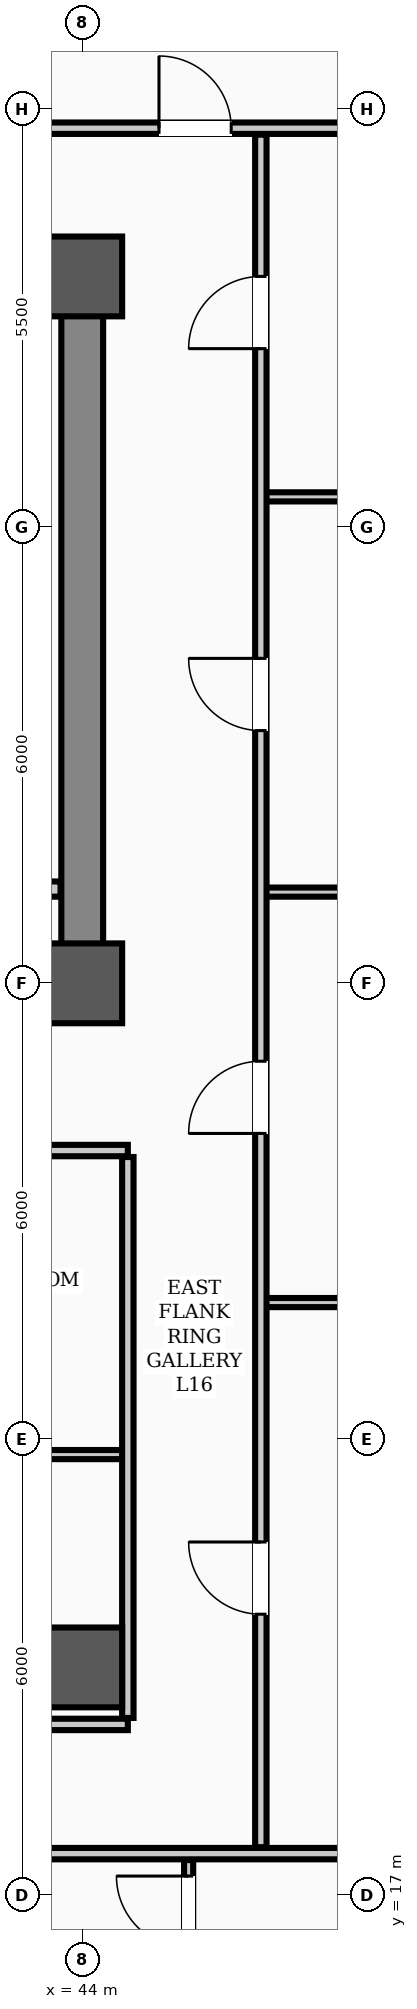
"""IFC4 building model, lengths in metres.
Left out: names, types, materials, properties, quantities, classifications, styles, units other than length and angle.
Written with IfcOpenShell. Run it as: python <this file> out.ifc"""

import sys

from ifc_helpers import new_model, si_unit, direction, frame, frame_2d, origin, origin_2d, place, context, subcontext, project, spatial, rectangle, hollow_rectangle, extrude, element, fill, save


model = new_model("IFC4")
c1 = context("Model", 3, precision=1e-05, world=origin(), true_north=direction((0.0, 1.0)))
c2 = subcontext(c1, "Body", "Model", "MODEL_VIEW")
j1 = project(units=[si_unit("LENGTHUNIT", "METRE"), si_unit("PLANEANGLEUNIT", "RADIAN")], contexts=[c1])
p1 = place(None, origin())
s1 = spatial("IfcSite", under=j1, at=p1, CompositionType="ELEMENT")
p2 = place(p1, origin())
s2 = spatial("IfcBuilding", under=s1, at=p2, CompositionType="ELEMENT")
p3 = place(p2, frame((0.0, 0.0, 65.5)))
s3 = spatial("IfcBuildingStorey", under=s2, at=p3, CompositionType="ELEMENT", Elevation=65.5)
for number, where, z_axis, x_axis in (
    (1, (44.0, 29.0, 0.0), (0.0, 0.0, 1.0), (1.0, 0.0, 0.0)),
    (2, (44.0, 38.3, 0.0), (0.0, 0.0, 1.0), (1.0, 0.0, 0.0)),
    (3, (44.0, 20.0, 0.0), (0.0, 0.0, 1.0), (1.0, 0.0, 0.0)),
):
    element("IfcColumn", number, at=place(p3, frame(where, z_axis=z_axis, x_axis=x_axis)), inside=s3, PredefinedType="COLUMN", context=c2, shape_type="SweptSolid", body=[
        extrude(hollow_rectangle(XDim=1.05, YDim=1.05, WallThickness=0.038, InnerFilletRadius=0.019, OuterFilletRadius=0.057, at=origin_2d()), origin(), (0.0, 0.0, 1.0), 3.9),
    ])
p4 = place(p3, frame((13.5, 29.0, 0.0), z_axis=(0.0, 0.0, 1.0), x_axis=(1.0, 0.0, 0.0)))
e4 = element("IfcWall", 4, at=p4, inside=s3, PredefinedType="SHEAR", context=c2, shape_type="SweptSolid", body=[
    extrude(rectangle(XDim=30.5, YDim=0.55, at=frame_2d((15.25, 0.0))), origin(), (0.0, 0.0, 1.0), 3.72),
])
p5 = place(p4, frame((1.75, 0.0, 0.0)))
e5 = element("IfcOpeningElement", 5, at=p5, cuts=e4, PredefinedType="OPENING", context=c2, shape_type="SweptSolid", body=[
    extrude(rectangle(XDim=1.1, YDim=2.08, at=frame_2d((0.55, 1.04))), frame((0.0, 0.285, 0.0), z_axis=(0.0, -1.0, 0.0), x_axis=(1.0, 0.0, 0.0)), (0.0, 0.0, 1.0), 0.57),
])
p6 = place(p4, frame((26.7, 0.0, 0.0)))
e6 = element("IfcOpeningElement", 6, at=p6, cuts=e4, PredefinedType="OPENING", context=c2, shape_type="SweptSolid", body=[
    extrude(rectangle(XDim=1.1, YDim=2.08, at=frame_2d((0.55, 1.04))), frame((0.0, 0.285, 0.0), z_axis=(0.0, -1.0, 0.0), x_axis=(1.0, 0.0, 0.0)), (0.0, 0.0, 1.0), 0.57),
])
p7 = place(p4, frame((6.8, 0.0, 0.0)))
e7 = element("IfcOpeningElement", 7, at=p7, cuts=e4, PredefinedType="OPENING", context=c2, shape_type="SweptSolid", body=[
    extrude(rectangle(XDim=1.1, YDim=2.08, at=frame_2d((0.55, 1.04))), frame((0.0, 0.285, 0.0), z_axis=(0.0, -1.0, 0.0), x_axis=(1.0, 0.0, 0.0)), (0.0, 0.0, 1.0), 0.57),
])
p8 = place(p4, frame((13.2, 0.0, 0.0)))
e8 = element("IfcOpeningElement", 8, at=p8, cuts=e4, PredefinedType="OPENING", context=c2, shape_type="SweptSolid", body=[
    extrude(rectangle(XDim=1.6, YDim=2.08, at=frame_2d((0.8, 1.04))), frame((0.0, 0.285, 0.0), z_axis=(0.0, -1.0, 0.0), x_axis=(1.0, 0.0, 0.0)), (0.0, 0.0, 1.0), 0.57),
])
p9 = place(p4, frame((19.53, 0.0, 0.0)))
e9 = element("IfcOpeningElement", 9, at=p9, cuts=e4, PredefinedType="OPENING", context=c2, shape_type="SweptSolid", body=[
    extrude(rectangle(XDim=0.9, YDim=2.08, at=frame_2d((0.45, 1.04))), frame((0.0, 0.285, 0.0), z_axis=(0.0, -1.0, 0.0), x_axis=(1.0, 0.0, 0.0)), (0.0, 0.0, 1.0), 0.57),
])
p10 = place(p4, frame((21.57, 0.0, 0.0)))
e10 = element("IfcOpeningElement", 10, at=p10, cuts=e4, PredefinedType="OPENING", context=c2, shape_type="SweptSolid", body=[
    extrude(rectangle(XDim=0.9, YDim=2.08, at=frame_2d((0.45, 1.04))), frame((0.0, 0.285, 0.0), z_axis=(0.0, -1.0, 0.0), x_axis=(1.0, 0.0, 0.0)), (0.0, 0.0, 1.0), 0.57),
])
p11 = place(p3, frame((13.5, 38.3, 0.0), z_axis=(0.0, 0.0, 1.0), x_axis=(1.0, 0.0, 0.0)))
e11 = element("IfcWall", 11, at=p11, inside=s3, PredefinedType="SHEAR", context=c2, shape_type="SweptSolid", body=[
    extrude(rectangle(XDim=30.5, YDim=0.55, at=frame_2d((15.25, 0.0))), origin(), (0.0, 0.0, 1.0), 3.72),
])
p12 = place(p3, frame((44.0, 29.35, 0.0), z_axis=(0.0, 0.0, 1.0), x_axis=(0.0, 1.0, 0.0)))
e12 = element("IfcWall", 12, at=p12, inside=s3, PredefinedType="SHEAR", context=c2, shape_type="SweptSolid", body=[
    extrude(rectangle(XDim=8.6, YDim=0.55, at=frame_2d((4.3, 0.0))), origin(), (0.0, 0.0, 1.0), 3.72),
])
p13 = place(p3, frame((42.4, 30.24, 0.0), z_axis=(0.0, 0.0, 1.0), x_axis=(1.0, 0.0, 0.0)))
e13 = element("IfcWall", 13, at=p13, inside=s3, PredefinedType="STANDARD", context=c2, shape_type="SweptSolid", body=[
    extrude(rectangle(XDim=1.315, YDim=0.2, at=frame_2d((0.658, 0.0))), origin(), (0.0, 0.0, 1.0), 3.1),
])
p14 = place(p3, frame((12.9, 26.8, 0.0), z_axis=(0.0, 0.0, 1.0), x_axis=(1.0, 0.0, 0.0)))
e14 = element("IfcWall", 14, at=p14, inside=s3, PredefinedType="PARTITIONING", context=c2, shape_type="SweptSolid", body=[
    extrude(rectangle(XDim=31.7, YDim=0.15, at=frame_2d((15.85, 0.0))), origin(), (0.0, 0.0, 1.0), 3.1),
])
p15 = place(p14, frame((13.6, 0.0, 0.0)))
e15 = element("IfcOpeningElement", 15, at=p15, cuts=e14, PredefinedType="OPENING", context=c2, shape_type="SweptSolid", body=[
    extrude(rectangle(XDim=1.6, YDim=2.08, at=frame_2d((0.8, 1.04))), frame((0.0, 0.085, 0.0), z_axis=(0.0, -1.0, 0.0), x_axis=(1.0, 0.0, 0.0)), (0.0, 0.0, 1.0), 0.17),
])
p16 = place(p14, frame((2.475, 0.0, 0.0)))
e16 = element("IfcOpeningElement", 16, at=p16, cuts=e14, PredefinedType="OPENING", context=c2, shape_type="SweptSolid", body=[
    extrude(rectangle(XDim=0.95, YDim=2.08, at=frame_2d((0.475, 1.04))), frame((0.0, 0.085, 0.0), z_axis=(0.0, -1.0, 0.0), x_axis=(1.0, 0.0, 0.0)), (0.0, 0.0, 1.0), 0.17),
])
p17 = place(p14, frame((9.125, 0.0, 0.0)))
e17 = element("IfcOpeningElement", 17, at=p17, cuts=e14, PredefinedType="OPENING", context=c2, shape_type="SweptSolid", body=[
    extrude(rectangle(XDim=0.95, YDim=2.08, at=frame_2d((0.475, 1.04))), frame((0.0, 0.085, 0.0), z_axis=(0.0, -1.0, 0.0), x_axis=(1.0, 0.0, 0.0)), (0.0, 0.0, 1.0), 0.17),
])
p18 = place(p14, frame((19.125, 0.0, 0.0)))
e18 = element("IfcOpeningElement", 18, at=p18, cuts=e14, PredefinedType="OPENING", context=c2, shape_type="SweptSolid", body=[
    extrude(rectangle(XDim=0.95, YDim=2.08, at=frame_2d((0.475, 1.04))), frame((0.0, 0.085, 0.0), z_axis=(0.0, -1.0, 0.0), x_axis=(1.0, 0.0, 0.0)), (0.0, 0.0, 1.0), 0.17),
])
p19 = place(p14, frame((26.325, 0.0, 0.0)))
e19 = element("IfcOpeningElement", 19, at=p19, cuts=e14, PredefinedType="OPENING", context=c2, shape_type="SweptSolid", body=[
    extrude(rectangle(XDim=0.95, YDim=2.08, at=frame_2d((0.475, 1.04))), frame((0.0, 0.085, 0.0), z_axis=(0.0, -1.0, 0.0), x_axis=(1.0, 0.0, 0.0)), (0.0, 0.0, 1.0), 0.17),
])
p20 = place(p3, frame((10.16, 17.55, 0.0), z_axis=(0.0, 0.0, 1.0), x_axis=(1.0, 0.0, 0.0)))
e20 = element("IfcWall", 20, at=p20, inside=s3, PredefinedType="PARTITIONING", context=c2, shape_type="SweptSolid", body=[
    extrude(rectangle(XDim=44.68, YDim=0.15, at=frame_2d((22.34, 0.0))), origin(), (0.0, 0.0, 1.0), 3.1),
])
p21 = place(p20, frame((2.04, 0.0, 0.0)))
e21 = element("IfcOpeningElement", 21, at=p21, cuts=e20, PredefinedType="OPENING", context=c2, shape_type="SweptSolid", body=[
    extrude(rectangle(XDim=0.95, YDim=2.08, at=frame_2d((0.475, 1.04))), frame((0.0, 0.085, 0.0), z_axis=(0.0, -1.0, 0.0), x_axis=(1.0, 0.0, 0.0)), (0.0, 0.0, 1.0), 0.17),
])
p22 = place(p20, frame((6.565, 0.0, 0.0)))
e22 = element("IfcOpeningElement", 22, at=p22, cuts=e20, PredefinedType="OPENING", context=c2, shape_type="SweptSolid", body=[
    extrude(rectangle(XDim=0.95, YDim=2.08, at=frame_2d((0.475, 1.04))), frame((0.0, 0.085, 0.0), z_axis=(0.0, -1.0, 0.0), x_axis=(1.0, 0.0, 0.0)), (0.0, 0.0, 1.0), 0.17),
])
p23 = place(p20, frame((11.865, 0.0, 0.0)))
e23 = element("IfcOpeningElement", 23, at=p23, cuts=e20, PredefinedType="OPENING", context=c2, shape_type="SweptSolid", body=[
    extrude(rectangle(XDim=0.95, YDim=2.08, at=frame_2d((0.475, 1.04))), frame((0.0, 0.085, 0.0), z_axis=(0.0, -1.0, 0.0), x_axis=(1.0, 0.0, 0.0)), (0.0, 0.0, 1.0), 0.17),
])
p24 = place(p20, frame((24.665, 0.0, 0.0)))
e24 = element("IfcOpeningElement", 24, at=p24, cuts=e20, PredefinedType="OPENING", context=c2, shape_type="SweptSolid", body=[
    extrude(rectangle(XDim=0.95, YDim=2.08, at=frame_2d((0.475, 1.04))), frame((0.0, 0.085, 0.0), z_axis=(0.0, -1.0, 0.0), x_axis=(1.0, 0.0, 0.0)), (0.0, 0.0, 1.0), 0.17),
])
p25 = place(p20, frame((31.765, 0.0, 0.0)))
e25 = element("IfcOpeningElement", 25, at=p25, cuts=e20, PredefinedType="OPENING", context=c2, shape_type="SweptSolid", body=[
    extrude(rectangle(XDim=0.95, YDim=2.08, at=frame_2d((0.475, 1.04))), frame((0.0, 0.085, 0.0), z_axis=(0.0, -1.0, 0.0), x_axis=(1.0, 0.0, 0.0)), (0.0, 0.0, 1.0), 0.17),
])
p26 = place(p3, frame((28.4, 19.25, 0.0), z_axis=(0.0, 0.0, 1.0), x_axis=(1.0, 0.0, 0.0)))
e26 = element("IfcWall", 26, at=p26, inside=s3, PredefinedType="PARTITIONING", context=c2, shape_type="SweptSolid", body=[
    extrude(rectangle(XDim=16.2, YDim=0.15, at=frame_2d((8.1, 0.0))), origin(), (0.0, 0.0, 1.0), 3.1),
])
p27 = place(p26, frame((3.625, 0.0, 0.0)))
e27 = element("IfcOpeningElement", 27, at=p27, cuts=e26, PredefinedType="OPENING", context=c2, shape_type="SweptSolid", body=[
    extrude(rectangle(XDim=0.95, YDim=2.08, at=frame_2d((0.475, 1.04))), frame((0.0, 0.085, 0.0), z_axis=(0.0, -1.0, 0.0), x_axis=(1.0, 0.0, 0.0)), (0.0, 0.0, 1.0), 0.17),
])
p28 = place(p26, frame((10.825, 0.0, 0.0)))
e28 = element("IfcOpeningElement", 28, at=p28, cuts=e26, PredefinedType="OPENING", context=c2, shape_type="SweptSolid", body=[
    extrude(rectangle(XDim=0.95, YDim=2.08, at=frame_2d((0.475, 1.04))), frame((0.0, 0.085, 0.0), z_axis=(0.0, -1.0, 0.0), x_axis=(1.0, 0.0, 0.0)), (0.0, 0.0, 1.0), 0.17),
])
p29 = place(p3, frame((34.8, 22.8, 0.0), z_axis=(0.0, 0.0, 1.0), x_axis=(1.0, 0.0, 0.0)))
e29 = element("IfcWall", 29, at=p29, inside=s3, PredefinedType="PARTITIONING", context=c2, shape_type="SweptSolid", body=[
    extrude(rectangle(XDim=9.8, YDim=0.12, at=frame_2d((4.9, 0.0))), origin(), (0.0, 0.0, 1.0), 3.1),
])
for number, where, z_axis, x_axis in (
    (30, (46.35, 24.8, 0.0), (0.0, 0.0, 1.0), (1.0, 0.0, 0.0)),
    (31, (46.35, 30.2, 0.0), (0.0, 0.0, 1.0), (1.0, 0.0, 0.0)),
    (32, (46.35, 35.4, 0.0), (0.0, 0.0, 1.0), (1.0, 0.0, 0.0)),
):
    element("IfcWall", number, at=place(p3, frame(where, z_axis=z_axis, x_axis=x_axis)), inside=s3, PredefinedType="PARTITIONING", context=c2, shape_type="SweptSolid", body=[
        extrude(rectangle(XDim=10.84, YDim=0.12, at=frame_2d((5.42, 0.0))), origin(), (0.0, 0.0, 1.0), 3.212),
    ])
p30 = place(p3, frame((7.81, 40.25, 0.0), z_axis=(0.0, 0.0, 1.0), x_axis=(1.0, 0.0, 0.0)))
e33 = element("IfcWall", 33, at=p30, inside=s3, PredefinedType="PARTITIONING", context=c2, shape_type="SweptSolid", body=[
    extrude(rectangle(XDim=49.38, YDim=0.15, at=frame_2d((24.69, 0.0))), origin(), (0.0, 0.0, 1.0), 3.1),
])
p31 = place(p30, frame((3.73, 0.0, 0.0)))
e34 = element("IfcOpeningElement", 34, at=p31, cuts=e33, PredefinedType="OPENING", context=c2, shape_type="SweptSolid", body=[
    extrude(rectangle(XDim=0.95, YDim=2.08, at=frame_2d((0.475, 1.04))), frame((0.0, 0.085, 0.0), z_axis=(0.0, -1.0, 0.0), x_axis=(1.0, 0.0, 0.0)), (0.0, 0.0, 1.0), 0.17),
])
p32 = place(p30, frame((11.015, 0.0, 0.0)))
e35 = element("IfcOpeningElement", 35, at=p32, cuts=e33, PredefinedType="OPENING", context=c2, shape_type="SweptSolid", body=[
    extrude(rectangle(XDim=0.95, YDim=2.08, at=frame_2d((0.475, 1.04))), frame((0.0, 0.085, 0.0), z_axis=(0.0, -1.0, 0.0), x_axis=(1.0, 0.0, 0.0)), (0.0, 0.0, 1.0), 0.17),
])
p33 = place(p30, frame((18.215, 0.0, 0.0)))
e36 = element("IfcOpeningElement", 36, at=p33, cuts=e33, PredefinedType="OPENING", context=c2, shape_type="SweptSolid", body=[
    extrude(rectangle(XDim=0.95, YDim=2.08, at=frame_2d((0.475, 1.04))), frame((0.0, 0.085, 0.0), z_axis=(0.0, -1.0, 0.0), x_axis=(1.0, 0.0, 0.0)), (0.0, 0.0, 1.0), 0.17),
])
p34 = place(p30, frame((25.515, 0.0, 0.0)))
e37 = element("IfcOpeningElement", 37, at=p34, cuts=e33, PredefinedType="OPENING", context=c2, shape_type="SweptSolid", body=[
    extrude(rectangle(XDim=0.95, YDim=2.08, at=frame_2d((0.475, 1.04))), frame((0.0, 0.085, 0.0), z_axis=(0.0, -1.0, 0.0), x_axis=(1.0, 0.0, 0.0)), (0.0, 0.0, 1.0), 0.17),
])
p35 = place(p30, frame((31.915, 0.0, 0.0)))
e38 = element("IfcOpeningElement", 38, at=p35, cuts=e33, PredefinedType="OPENING", context=c2, shape_type="SweptSolid", body=[
    extrude(rectangle(XDim=0.95, YDim=2.08, at=frame_2d((0.475, 1.04))), frame((0.0, 0.085, 0.0), z_axis=(0.0, -1.0, 0.0), x_axis=(1.0, 0.0, 0.0)), (0.0, 0.0, 1.0), 0.17),
])
p36 = place(p30, frame((37.2, 0.0, 0.0)))
e39 = element("IfcOpeningElement", 39, at=p36, cuts=e33, PredefinedType="OPENING", context=c2, shape_type="SweptSolid", body=[
    extrude(rectangle(XDim=0.95, YDim=2.08, at=frame_2d((0.475, 1.04))), frame((0.0, 0.085, 0.0), z_axis=(0.0, -1.0, 0.0), x_axis=(1.0, 0.0, 0.0)), (0.0, 0.0, 1.0), 0.17),
])
p37 = place(p3, frame((46.35, 17.635, 0.0), z_axis=(0.0, 0.0, 1.0), x_axis=(0.0, 1.0, 0.0)))
e40 = element("IfcWall", 40, at=p37, inside=s3, PredefinedType="PARTITIONING", context=c2, shape_type="SweptSolid", body=[
    extrude(rectangle(XDim=22.53, YDim=0.15, at=frame_2d((11.265, 0.0))), origin(), (0.0, 0.0, 1.0), 3.0),
])
p38 = place(p37, frame((3.065, 0.0, 0.0)))
e41 = element("IfcOpeningElement", 41, at=p38, cuts=e40, PredefinedType="OPENING", context=c2, shape_type="SweptSolid", body=[
    extrude(rectangle(XDim=0.95, YDim=2.08, at=frame_2d((0.475, 1.04))), frame((0.0, 0.085, 0.0), z_axis=(0.0, -1.0, 0.0), x_axis=(1.0, 0.0, 0.0)), (0.0, 0.0, 1.0), 0.17),
])
p39 = place(p37, frame((9.39, 0.0, 0.0)))
e42 = element("IfcOpeningElement", 42, at=p39, cuts=e40, PredefinedType="OPENING", context=c2, shape_type="SweptSolid", body=[
    extrude(rectangle(XDim=0.95, YDim=2.08, at=frame_2d((0.475, 1.04))), frame((0.0, 0.085, 0.0), z_axis=(0.0, -1.0, 0.0), x_axis=(1.0, 0.0, 0.0)), (0.0, 0.0, 1.0), 0.17),
])
p40 = place(p37, frame((14.69, 0.0, 0.0)))
e43 = element("IfcOpeningElement", 43, at=p40, cuts=e40, PredefinedType="OPENING", context=c2, shape_type="SweptSolid", body=[
    extrude(rectangle(XDim=0.95, YDim=2.08, at=frame_2d((0.475, 1.04))), frame((0.0, 0.085, 0.0), z_axis=(0.0, -1.0, 0.0), x_axis=(1.0, 0.0, 0.0)), (0.0, 0.0, 1.0), 0.17),
])
p41 = place(p37, frame((19.715, 0.0, 0.0)))
e44 = element("IfcOpeningElement", 44, at=p41, cuts=e40, PredefinedType="OPENING", context=c2, shape_type="SweptSolid", body=[
    extrude(rectangle(XDim=0.95, YDim=2.08, at=frame_2d((0.475, 1.04))), frame((0.0, 0.085, 0.0), z_axis=(0.0, -1.0, 0.0), x_axis=(1.0, 0.0, 0.0)), (0.0, 0.0, 1.0), 0.17),
])
p42 = place(p3, frame((44.6, 19.335, 0.0), z_axis=(0.0, 0.0, 1.0), x_axis=(0.0, 1.0, 0.0)))
e45 = element("IfcWall", 45, at=p42, inside=s3, PredefinedType="PARTITIONING", context=c2, shape_type="SweptSolid", body=[
    extrude(rectangle(XDim=7.38, YDim=0.15, at=frame_2d((3.69, 0.0))), origin(), (0.0, 0.0, 1.0), 3.0),
])
p43 = place(p3, frame((45.4, 15.31, 0.0), z_axis=(0.0, 0.0, 1.0), x_axis=(0.0, 1.0, 0.0)))
e46 = element("IfcWall", 46, at=p43, inside=s3, PredefinedType="PARTITIONING", context=c2, shape_type="SweptSolid", body=[
    extrude(rectangle(XDim=2.155, YDim=0.12, at=frame_2d((1.078, 0.0))), origin(), (0.0, 0.0, 1.0), 3.72),
])
p44 = place(p43, frame((0.995, 0.0, 0.0)))
e47 = element("IfcOpeningElement", 47, at=p44, cuts=e46, PredefinedType="OPENING", context=c2, shape_type="SweptSolid", body=[
    extrude(rectangle(XDim=0.95, YDim=2.08, at=frame_2d((0.475, 1.04))), frame((0.0, 0.07, 0.0), z_axis=(0.0, -1.0, 0.0), x_axis=(1.0, 0.0, 0.0)), (0.0, 0.0, 1.0), 0.14),
])
p45 = place(p44, origin())
e48 = element("IfcDoor", 48, at=p45, inside=s3, OperationType="SINGLE_SWING_RIGHT", PredefinedType="DOOR", context=c2, shape_type="SweptSolid", body=[
    extrude(rectangle(XDim=0.95, YDim=2.08, at=frame_2d((0.475, 1.04))), frame((0.0, 0.025, 0.0), z_axis=(0.0, -1.0, 0.0), x_axis=(1.0, 0.0, 0.0)), (0.0, 0.0, 1.0), 0.05),
])
fill(e47, e48)
p46 = place(p38, origin())
e49 = element("IfcDoor", 49, at=p46, inside=s3, OperationType="SINGLE_SWING_RIGHT", PredefinedType="DOOR", context=c2, shape_type="SweptSolid", body=[
    extrude(rectangle(XDim=0.95, YDim=2.08, at=frame_2d((0.475, 1.04))), frame((0.0, 0.025, 0.0), z_axis=(0.0, -1.0, 0.0), x_axis=(1.0, 0.0, 0.0)), (0.0, 0.0, 1.0), 0.05),
])
fill(e41, e49)
p47 = place(p39, origin())
e50 = element("IfcDoor", 50, at=p47, inside=s3, OperationType="SINGLE_SWING_LEFT", PredefinedType="DOOR", context=c2, shape_type="SweptSolid", body=[
    extrude(rectangle(XDim=0.95, YDim=2.08, at=frame_2d((0.475, 1.04))), frame((0.0, 0.025, 0.0), z_axis=(0.0, -1.0, 0.0), x_axis=(1.0, 0.0, 0.0)), (0.0, 0.0, 1.0), 0.05),
])
fill(e42, e50)
p48 = place(p40, origin())
e51 = element("IfcDoor", 51, at=p48, inside=s3, OperationType="SINGLE_SWING_RIGHT", PredefinedType="DOOR", context=c2, shape_type="SweptSolid", body=[
    extrude(rectangle(XDim=0.95, YDim=2.08, at=frame_2d((0.475, 1.04))), frame((0.0, 0.025, 0.0), z_axis=(0.0, -1.0, 0.0), x_axis=(1.0, 0.0, 0.0)), (0.0, 0.0, 1.0), 0.05),
])
fill(e43, e51)
p49 = place(p41, origin())
e52 = element("IfcDoor", 52, at=p49, inside=s3, OperationType="SINGLE_SWING_LEFT", PredefinedType="DOOR", context=c2, shape_type="SweptSolid", body=[
    extrude(rectangle(XDim=0.95, YDim=2.08, at=frame_2d((0.475, 1.04))), frame((0.0, 0.025, 0.0), z_axis=(0.0, -1.0, 0.0), x_axis=(1.0, 0.0, 0.0)), (0.0, 0.0, 1.0), 0.05),
])
fill(e44, e52)
p50 = place(p36, origin())
e53 = element("IfcDoor", 53, at=p50, inside=s3, OperationType="SINGLE_SWING_LEFT", PredefinedType="DOOR", context=c2, shape_type="SweptSolid", body=[
    extrude(rectangle(XDim=0.95, YDim=2.08, at=frame_2d((0.475, 1.04))), frame((0.0, 0.025, 0.0), z_axis=(0.0, -1.0, 0.0), x_axis=(1.0, 0.0, 0.0)), (0.0, 0.0, 1.0), 0.05),
])
fill(e39, e53)
save(model, sys.argv[1])
